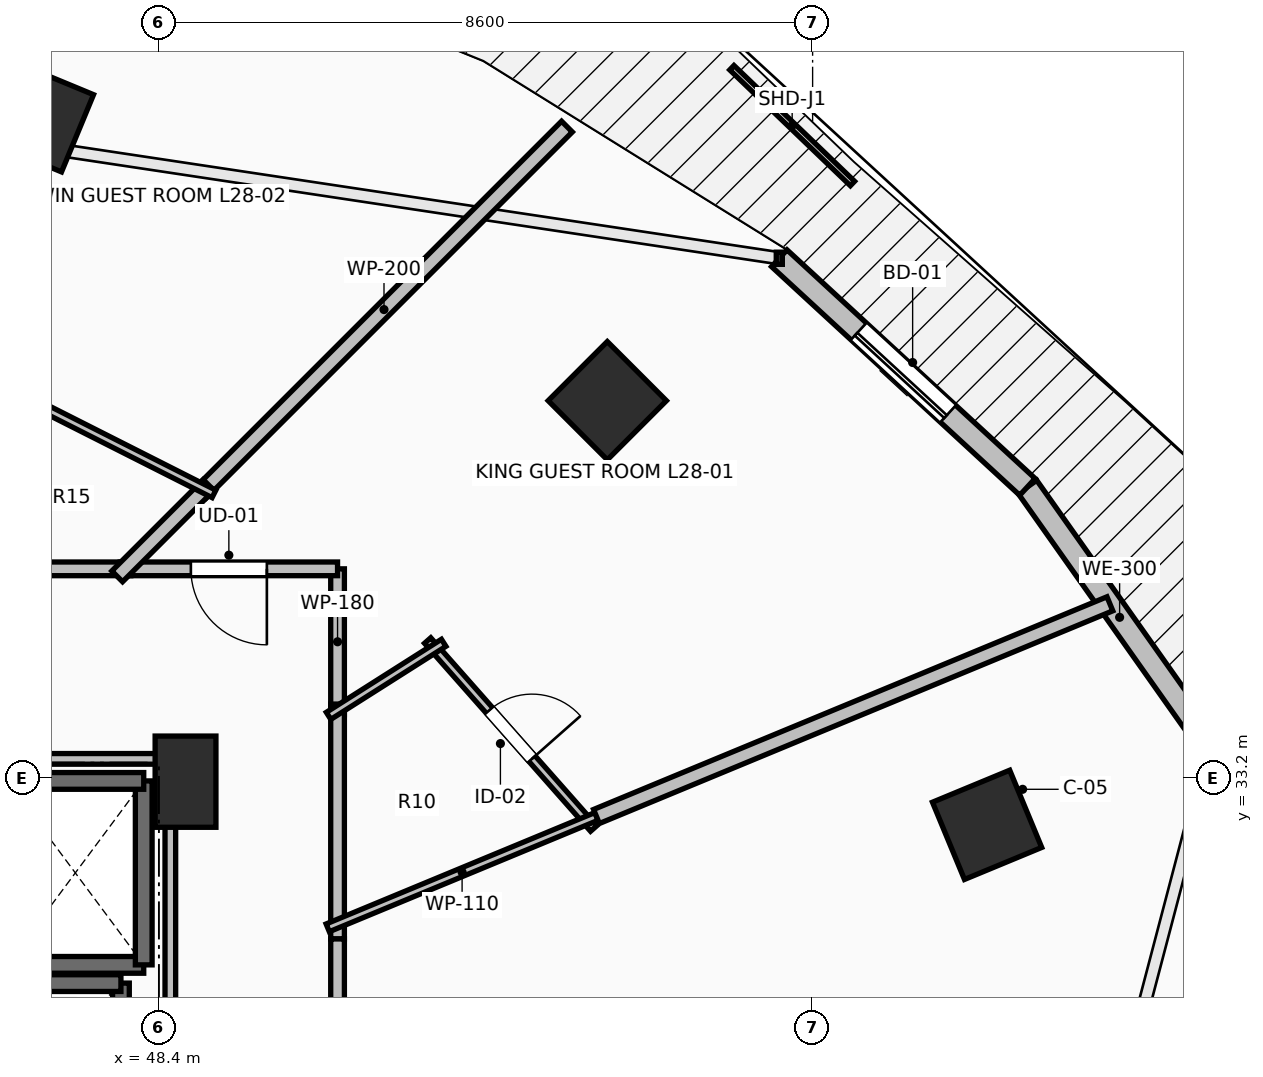
"""IFC4 building model, lengths in metres.
Left out: names, types, materials, properties, quantities, classifications, styles, units other than length and angle.
Written with IfcOpenShell. Run it as: python <this file> out.ifc"""

import sys

from ifc_helpers import new_model, si_unit, direction, frame, frame_2d, origin, origin_2d, place, context, subcontext, project, spatial, rectangle, extrude, element, fill, save


model = new_model("IFC4")
c1 = context("Model", 3, precision=1e-05, world=origin(), true_north=direction((0.0, 1.0)))
c2 = subcontext(c1, "Body", "Model", "MODEL_VIEW")
j1 = project(units=[si_unit("LENGTHUNIT", "METRE"), si_unit("PLANEANGLEUNIT", "RADIAN")], contexts=[c1])
p1 = place(None, origin())
s1 = spatial("IfcSite", under=j1, at=p1, CompositionType="ELEMENT")
p2 = place(p1, origin())
s2 = spatial("IfcBuilding", under=s1, at=p2, CompositionType="ELEMENT")
p3 = place(p2, frame((0.0, 0.0, 106.8)))
s3 = spatial("IfcBuildingStorey", under=s2, at=p3, CompositionType="ELEMENT", Elevation=106.8)
for number, where, z_axis, x_axis in (
    (1, (59.295, 32.582, 0.0), (0.0, 0.0, 1.0), (0.924, 0.383, 0.0)),
    (2, (54.299, 38.162, 0.0), (0.0, 0.0, 1.0), (0.707, 0.707, 0.0)),
    (3, (46.821, 41.891, 0.0), (0.0, 0.0, 1.0), (0.383, 0.924, 0.0)),
):
    element("IfcColumn", number, at=place(p3, frame(where, z_axis=z_axis, x_axis=x_axis)), inside=s3, PredefinedType="COLUMN", context=c2, shape_type="SweptSolid", body=[
        extrude(rectangle(XDim=1.1, YDim=1.1, at=origin_2d()), origin(), (0.0, 0.0, 1.0), 3.5),
    ])
p4 = place(p3, frame((48.75, 33.15, 0.0), z_axis=(0.0, 0.0, 1.0), x_axis=(1.0, 0.0, 0.0)))
e4 = element("IfcColumn", 4, at=p4, inside=s3, PredefinedType="PILASTER", context=c2, shape_type="SweptSolid", body=[
    extrude(rectangle(XDim=0.8, YDim=1.2, at=origin_2d()), origin(), (0.0, 0.0, 1.0), 3.5),
])
p5 = place(p3, frame((62.252, 33.596, 0.0), z_axis=(0.0, 0.0, 1.0), x_axis=(-0.57716435238, 0.81662801222, 0.0)))
e5 = element("IfcWall", 5, at=p5, inside=s3, PredefinedType="STANDARD", context=c2, shape_type="SweptSolid", body=[
    extrude(rectangle(XDim=4.202, YDim=0.3, at=frame_2d((2.101, 0.0))), origin(), (0.0, 0.0, 1.0), 3.24),
])
p6 = place(p3, frame((59.826, 37.028, 0.0), z_axis=(0.0, 0.0, 1.0), x_axis=(-0.735416718093, 0.677615119924, 0.0)))
e6 = element("IfcWall", 6, at=p6, inside=s3, PredefinedType="STANDARD", context=c2, shape_type="SweptSolid", body=[
    extrude(rectangle(XDim=4.439, YDim=0.3, at=frame_2d((2.22, 0.0))), origin(), (0.0, 0.0, 1.0), 3.24),
])
p7 = place(p6, frame((1.419, 0.0, 0.0)))
e7 = element("IfcOpeningElement", 7, at=p7, cuts=e6, PredefinedType="OPENING", context=c2, shape_type="SweptSolid", body=[
    extrude(rectangle(XDim=1.6, YDim=2.3, at=frame_2d((0.8, 1.15))), frame((0.0, 0.165, 0.0), z_axis=(0.0, -1.0, 0.0), x_axis=(1.0, 0.0, 0.0)), (0.0, 0.0, 1.0), 0.33),
])
p8 = place(p3, frame((46.4, 30.74, 0.0), z_axis=(0.0, 0.0, 1.0), x_axis=(1.0, 0.0, 0.0)))
e8 = element("IfcWall", 8, at=p8, inside=s3, PredefinedType="SOLIDWALL", context=c2, shape_type="SweptSolid", body=[
    extrude(rectangle(XDim=1.8, YDim=0.22, at=frame_2d((0.9, 0.0))), origin(), (0.0, 0.0, 1.0), 3.24),
])
p9 = place(p3, frame((48.2, 30.74, 0.0), z_axis=(0.0, 0.0, 1.0), x_axis=(0.0, 1.0, 0.0)))
e9 = element("IfcWall", 9, at=p9, inside=s3, PredefinedType="SOLIDWALL", context=c2, shape_type="SweptSolid", body=[
    extrude(rectangle(XDim=2.42, YDim=0.22, at=frame_2d((1.21, 0.0))), origin(), (0.0, 0.0, 1.0), 3.24),
])
p10 = place(p3, frame((48.2, 33.16, 0.0), z_axis=(0.0, 0.0, 1.0), x_axis=(-1.0, 0.0, 0.0)))
e10 = element("IfcWall", 10, at=p10, inside=s3, PredefinedType="SOLIDWALL", context=c2, shape_type="SweptSolid", body=[
    extrude(rectangle(XDim=1.8, YDim=0.22, at=frame_2d((0.9, 0.0))), origin(), (0.0, 0.0, 1.0), 3.24),
])
p11 = place(p3, frame((47.9, 28.0, 0.0), z_axis=(0.0, 0.0, 1.0), x_axis=(0.0, 1.0, 0.0)))
e11 = element("IfcWall", 11, at=p11, inside=s3, PredefinedType="SHEAR", context=c2, shape_type="SweptSolid", body=[
    extrude(rectangle(XDim=2.5, YDim=0.22, at=frame_2d((1.25, 0.0))), origin(), (0.0, 0.0, 1.0), 3.24),
])
p12 = place(p3, frame((47.9, 30.5, 0.0), z_axis=(0.0, 0.0, 1.0), x_axis=(-1.0, 0.0, 0.0)))
e12 = element("IfcWall", 12, at=p12, inside=s3, PredefinedType="SHEAR", context=c2, shape_type="SweptSolid", body=[
    extrude(rectangle(XDim=2.4, YDim=0.22, at=frame_2d((1.2, 0.0))), origin(), (0.0, 0.0, 1.0), 3.24),
])
p13 = place(p3, frame((50.75, 34.031, 0.0), z_axis=(0.0, 0.0, 1.0), x_axis=(0.0, 1.0, 0.0)))
e13 = element("IfcWall", 13, at=p13, inside=s3, PredefinedType="PARTITIONING", context=c2, shape_type="SweptSolid", body=[
    extrude(rectangle(XDim=1.919, YDim=0.18, at=frame_2d((0.959, 0.0))), origin(), (0.0, 0.0, 1.0), 2.432),
])
p14 = place(p3, frame((50.75, 35.95, 0.0), z_axis=(0.0, 0.0, 1.0), x_axis=(-1.0, 0.0, 0.0)))
e14 = element("IfcWall", 14, at=p14, inside=s3, PredefinedType="PARTITIONING", context=c2, shape_type="SweptSolid", body=[
    extrude(rectangle(XDim=2.86, YDim=0.18, at=frame_2d((1.43, 0.0))), origin(), (0.0, 0.0, 1.0), 2.432),
])
p15 = place(p14, frame((0.93, 0.0, 0.0)))
e15 = element("IfcOpeningElement", 15, at=p15, cuts=e14, PredefinedType="OPENING", context=c2, shape_type="SweptSolid", body=[
    extrude(rectangle(XDim=1.0, YDim=2.15, at=frame_2d((0.5, 1.075))), frame((0.0, 0.105, 0.0), z_axis=(0.0, -1.0, 0.0), x_axis=(1.0, 0.0, 0.0)), (0.0, 0.0, 1.0), 0.21),
])
p16 = place(p3, frame((50.75, 31.081, 0.0), z_axis=(0.0, 0.0, 1.0), x_axis=(0.0, 1.0, 0.0)))
e16 = element("IfcWall", 16, at=p16, inside=s3, PredefinedType="PARTITIONING", context=c2, shape_type="SweptSolid", body=[
    extrude(rectangle(XDim=3.09, YDim=0.18, at=frame_2d((1.545, 0.0))), origin(), (0.0, 0.0, 1.0), 2.432),
])
p17 = place(p3, frame((48.03, 35.95, 0.0), z_axis=(0.0, 0.0, 1.0), x_axis=(-1.0, 0.0, 0.0)))
e17 = element("IfcWall", 17, at=p17, inside=s3, PredefinedType="PARTITIONING", context=c2, shape_type="SweptSolid", body=[
    extrude(rectangle(XDim=3.104, YDim=0.18, at=frame_2d((1.552, 0.0))), origin(), (0.0, 0.0, 1.0), 2.432),
])
p18 = place(p3, frame((50.75, 14.1, 0.0), z_axis=(0.0, 0.0, 1.0), x_axis=(0.0, 1.0, 0.0)))
e18 = element("IfcWall", 18, at=p18, inside=s3, PredefinedType="PARTITIONING", context=c2, shape_type="SweptSolid", body=[
    extrude(rectangle(XDim=16.981, YDim=0.18, at=frame_2d((8.49, 0.0))), origin(), (0.0, 0.0, 1.0), 2.432),
])
p19 = place(p18, frame((7.99, 0.0, 0.0)))
e19 = element("IfcOpeningElement", 19, at=p19, cuts=e18, PredefinedType="OPENING", context=c2, shape_type="SweptSolid", body=[
    extrude(rectangle(XDim=1.0, YDim=2.15, at=frame_2d((0.5, 1.075))), frame((0.0, 0.105, 0.0), z_axis=(0.0, -1.0, 0.0), x_axis=(1.0, 0.0, 0.0)), (0.0, 0.0, 1.0), 0.21),
])
p20 = place(p3, frame((51.935, 35.007, 0.0), z_axis=(0.0, 0.0, 1.0), x_axis=(0.662059609276, -0.749451181709, 0.0)))
e20 = element("IfcWall", 20, at=p20, inside=s3, PredefinedType="PARTITIONING", context=c2, shape_type="SweptSolid", body=[
    extrude(rectangle(XDim=3.299, YDim=0.11, at=frame_2d((1.65, 0.0))), origin(), (0.0, 0.0, 1.0), 2.432),
])
p21 = place(p20, frame((1.225, 0.0, 0.0)))
e21 = element("IfcOpeningElement", 21, at=p21, cuts=e20, PredefinedType="OPENING", context=c2, shape_type="SweptSolid", body=[
    extrude(rectangle(XDim=0.85, YDim=2.1, at=frame_2d((0.425, 1.05))), frame((0.0, 0.07, 0.0), z_axis=(0.0, -1.0, 0.0), x_axis=(1.0, 0.0, 0.0)), (0.0, 0.0, 1.0), 0.14),
])
p22 = place(p3, frame((54.156, 32.693, 0.0), z_axis=(0.0, 0.0, 1.0), x_axis=(-0.923803754276, -0.382866326002, 0.0)))
e22 = element("IfcWall", 22, at=p22, inside=s3, PredefinedType="PARTITIONING", context=c2, shape_type="SweptSolid", body=[
    extrude(rectangle(XDim=3.827, YDim=0.11, at=frame_2d((1.914, 0.0))), origin(), (0.0, 0.0, 1.0), 2.432),
])
p23 = place(p3, frame((50.632, 34.016, 0.0), z_axis=(0.0, 0.0, 1.0), x_axis=(0.844361394482, 0.535774052665, 0.0)))
e23 = element("IfcWall", 23, at=p23, inside=s3, PredefinedType="PARTITIONING", context=c2, shape_type="SweptSolid", body=[
    extrude(rectangle(XDim=1.793, YDim=0.11, at=frame_2d((0.897, 0.0))), origin(), (0.0, 0.0, 1.0), 2.886),
])
p24 = place(p3, frame((53.768, 41.768, 0.0), z_axis=(0.0, 0.0, 1.0), x_axis=(-0.707106781187, -0.707106781187, 0.0)))
e24 = element("IfcWall", 24, at=p24, inside=s3, PredefinedType="PARTITIONING", context=c2, shape_type="SweptSolid", body=[
    extrude(rectangle(XDim=6.808, YDim=0.2, at=frame_2d((3.404, 0.0))), origin(), (0.0, 0.0, 1.0), 2.677),
])
p25 = place(p3, frame((49.053, 37.053, 0.0), z_axis=(0.0, 0.0, 1.0), x_axis=(-0.707106781187, -0.707106781187, 0.0)))
e25 = element("IfcWall", 25, at=p25, inside=s3, PredefinedType="PARTITIONING", context=c2, shape_type="SweptSolid", body=[
    extrude(rectangle(XDim=1.7, YDim=0.2, at=frame_2d((0.85, 0.0))), origin(), (0.0, 0.0, 1.0), 2.432),
])
p26 = place(p3, frame((54.156, 32.692, 0.0), z_axis=(0.0, 0.0, 1.0), x_axis=(0.923875192571, 0.38269390974, 0.0)))
e26 = element("IfcWall", 26, at=p26, inside=s3, PredefinedType="PARTITIONING", context=c2, shape_type="SweptSolid", body=[
    extrude(rectangle(XDim=7.311, YDim=0.2, at=frame_2d((3.656, 0.0))), origin(), (0.0, 0.0, 1.0), 2.432),
])
p27 = place(p3, frame((46.462, 38.281, 0.0), z_axis=(0.0, 0.0, 1.0), x_axis=(0.892486842203, -0.451073426944, 0.0)))
e27 = element("IfcWall", 27, at=p27, inside=s3, PredefinedType="PARTITIONING", context=c2, shape_type="SweptSolid", body=[
    extrude(rectangle(XDim=2.982, YDim=0.11, at=frame_2d((1.491, 0.0))), origin(), (0.0, 0.0, 1.0), 2.432),
])
p28 = place(p3, frame((44.34, 33.45, 0.0), z_axis=(0.0, 0.0, 1.0), x_axis=(1.0, 0.0, 0.0)))
e28 = element("IfcWall", 28, at=p28, inside=s3, PredefinedType="PARTITIONING", context=c2, shape_type="SweptSolid", body=[
    extrude(rectangle(XDim=4.21, YDim=0.14, at=frame_2d((2.105, 0.0))), origin(), (0.0, 0.0, 1.0), 2.432),
])
p29 = place(p3, frame((48.55, 33.45, 0.0), z_axis=(0.0, 0.0, 1.0), x_axis=(0.0, -1.0, 0.0)))
e29 = element("IfcWall", 29, at=p29, inside=s3, PredefinedType="PARTITIONING", context=c2, shape_type="SweptSolid", body=[
    extrude(rectangle(XDim=5.254, YDim=0.14, at=frame_2d((2.627, 0.0))), origin(), (0.0, 0.0, 1.0), 2.432),
])
p30 = place(p7, origin())
e30 = element("IfcDoor", 30, at=p30, inside=s3, OperationType="SLIDING_TO_LEFT", PredefinedType="DOOR", context=c2, shape_type="SweptSolid", body=[
    extrude(rectangle(XDim=1.6, YDim=2.3, at=frame_2d((0.8, 1.15))), frame((0.0, 0.025, 0.0), z_axis=(0.0, -1.0, 0.0), x_axis=(1.0, 0.0, 0.0)), (0.0, 0.0, 1.0), 0.05),
])
fill(e7, e30)
p31 = place(p15, origin())
e31 = element("IfcDoor", 31, at=p31, inside=s3, OperationType="SINGLE_SWING_LEFT", PredefinedType="DOOR", context=c2, shape_type="SweptSolid", body=[
    extrude(rectangle(XDim=1.0, YDim=2.15, at=frame_2d((0.5, 1.075))), frame((0.0, 0.025, 0.0), z_axis=(0.0, -1.0, 0.0), x_axis=(1.0, 0.0, 0.0)), (0.0, 0.0, 1.0), 0.05),
])
fill(e15, e31)
p32 = place(p21, origin())
e32 = element("IfcDoor", 32, at=p32, inside=s3, OperationType="SINGLE_SWING_RIGHT", PredefinedType="DOOR", context=c2, shape_type="SweptSolid", body=[
    extrude(rectangle(XDim=0.85, YDim=2.1, at=frame_2d((0.425, 1.05))), frame((0.0, 0.025, 0.0), z_axis=(0.0, -1.0, 0.0), x_axis=(1.0, 0.0, 0.0)), (0.0, 0.0, 1.0), 0.05),
])
fill(e21, e32)
save(model, sys.argv[1])
